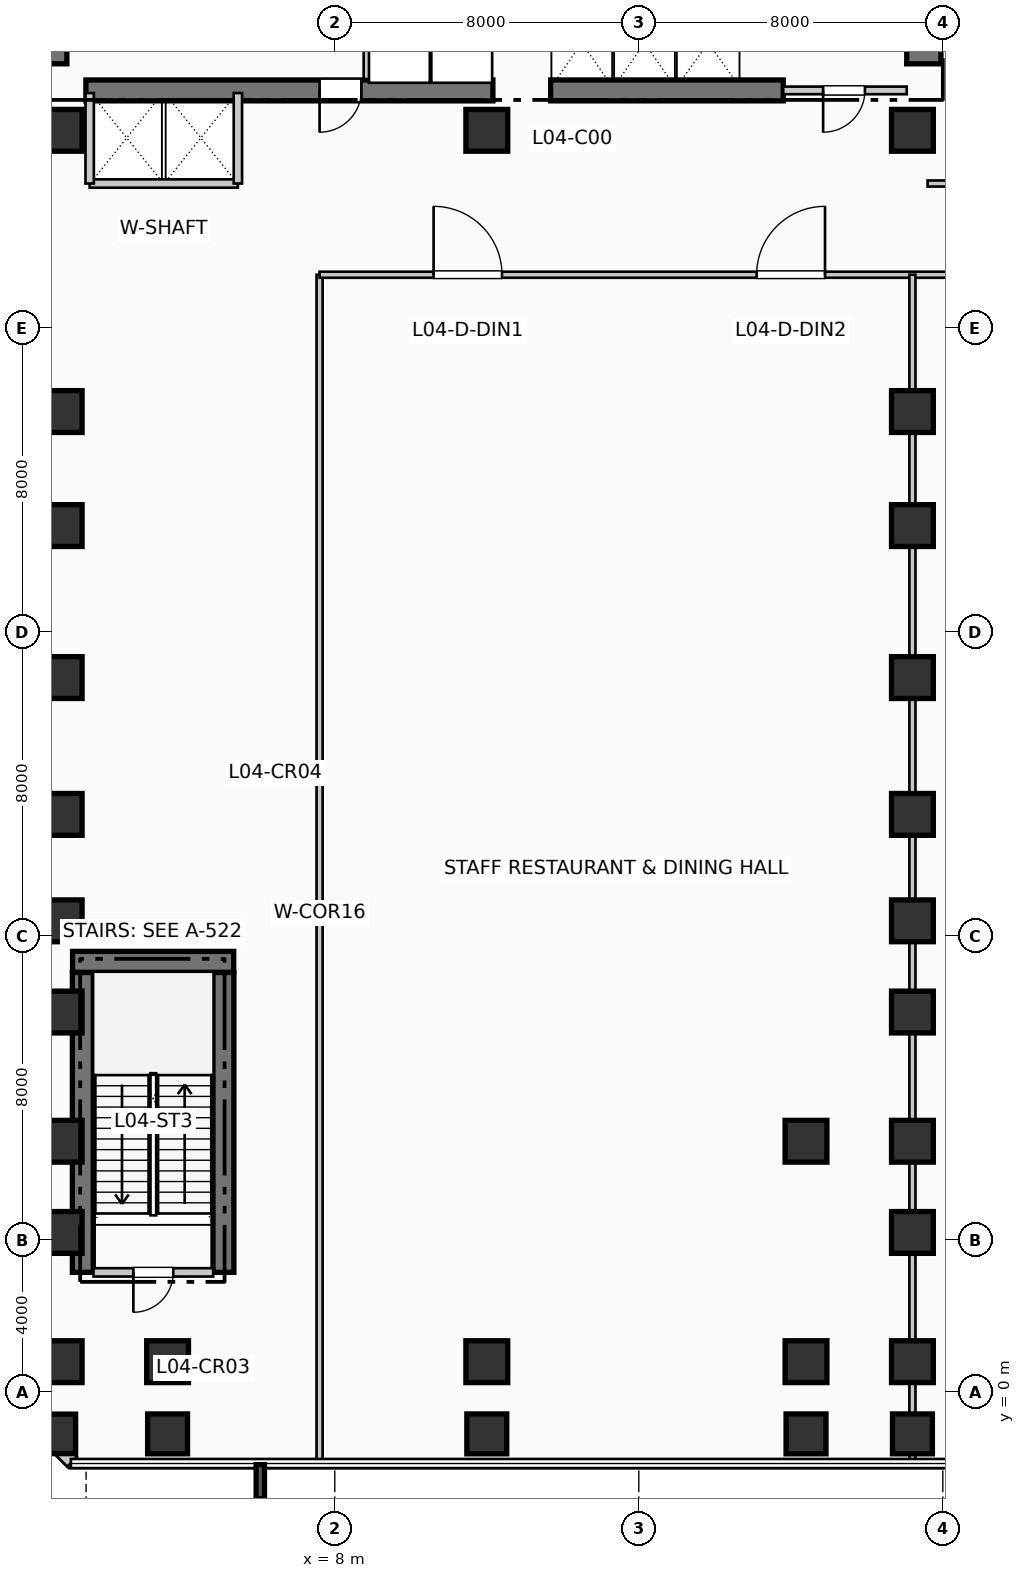
"""IFC4 building model, lengths in metres.
Left out: names, types, materials, properties, quantities, classifications, styles, units other than length and angle.
Written with IfcOpenShell. Run it as: python <this file> out.ifc"""

import sys

from ifc_helpers import new_model, si_unit, direction, frame, frame_2d, origin, origin_2d, place, context, subcontext, project, spatial, rectangle, extrude, element, fill, save


model = new_model("IFC4")
c1 = context("Model", 3, precision=1e-05, world=origin(), true_north=direction((0.0, 1.0)))
c2 = subcontext(c1, "Body", "Model", "MODEL_VIEW")
j1 = project(units=[si_unit("LENGTHUNIT", "METRE"), si_unit("PLANEANGLEUNIT", "RADIAN")], contexts=[c1])
p1 = place(None, origin())
s1 = spatial("IfcSite", under=j1, at=p1, CompositionType="ELEMENT")
p2 = place(p1, origin())
s2 = spatial("IfcBuilding", under=s1, at=p2, CompositionType="ELEMENT")
p3 = place(p2, frame((0.0, 0.0, 21.12)))
s3 = spatial("IfcBuildingStorey", under=s2, at=p3, CompositionType="ELEMENT", Elevation=21.12)
p4 = place(p3, frame((0.5, 34.95, 0.0), z_axis=(0.0, 0.0, 1.0), x_axis=(0.0, 1.0, 0.0)))
e1 = element("IfcWall", 1, at=p4, inside=s3, PredefinedType="SHEAR", context=c2, shape_type="SweptSolid", body=[
    extrude(rectangle(XDim=7.9, YDim=0.9, at=frame_2d((3.95, 0.0))), origin(), (0.0, 0.0, 1.0), 4.62),
])
p5 = place(p3, frame((23.5, 34.95, 0.0), z_axis=(0.0, 0.0, 1.0), x_axis=(0.0, 1.0, 0.0)))
e2 = element("IfcWall", 2, at=p5, inside=s3, PredefinedType="SHEAR", context=c2, shape_type="SweptSolid", body=[
    extrude(rectangle(XDim=10.64, YDim=0.9, at=frame_2d((5.32, 0.0))), origin(), (0.0, 0.0, 1.0), 4.62),
])
p6 = place(p3, frame((1.45, 34.25, 0.0), z_axis=(0.0, 0.0, 1.0), x_axis=(1.0, 0.0, 0.0)))
e3 = element("IfcWall", 3, at=p6, inside=s3, PredefinedType="SHEAR", context=c2, shape_type="SweptSolid", body=[
    extrude(rectangle(XDim=10.71, YDim=0.55, at=frame_2d((5.355, 0.0))), origin(), (0.0, 0.0, 1.0), 4.62),
])
p7 = place(p6, frame((7.25, 0.0, 0.0), z_axis=(0.0, 0.0, 1.0), x_axis=(-1.0, 0.0, 0.0)))
e4 = element("IfcOpeningElement", 4, at=p7, cuts=e3, PredefinedType="OPENING", context=c2, shape_type="SweptSolid", body=[
    extrude(rectangle(XDim=1.1, YDim=2.15, at=frame_2d((0.55, 1.075))), frame((0.0, 0.285, 0.0), z_axis=(0.0, -1.0, 0.0), x_axis=(1.0, 0.0, 0.0)), (0.0, 0.0, 1.0), 0.57),
])
p8 = place(p3, frame((13.68, 34.25, 0.0), z_axis=(0.0, 0.0, 1.0), x_axis=(1.0, 0.0, 0.0)))
e5 = element("IfcWall", 5, at=p8, inside=s3, PredefinedType="SHEAR", context=c2, shape_type="SweptSolid", body=[
    extrude(rectangle(XDim=6.12, YDim=0.55, at=frame_2d((3.06, 0.0))), origin(), (0.0, 0.0, 1.0), 4.62),
])
for number, where, z_axis, x_axis in (
    (6, (1.37, 3.15, 0.0), (0.0, 0.0, 1.0), (0.0, 1.0, 0.0)),
    (7, (5.07, 3.15, 0.0), (0.0, 0.0, 1.0), (0.0, 1.0, 0.0)),
):
    element("IfcWall", number, at=place(p3, frame(where, z_axis=z_axis, x_axis=x_axis)), inside=s3, PredefinedType="SHEAR", context=c2, shape_type="SweptSolid", body=[
        extrude(rectangle(XDim=7.89, YDim=0.55, at=frame_2d((3.945, 0.0))), origin(), (0.0, 0.0, 1.0), 4.62),
    ])
p9 = place(p3, frame((1.1, 11.32, 0.0), z_axis=(0.0, 0.0, 1.0), x_axis=(1.0, 0.0, 0.0)))
e8 = element("IfcWall", 8, at=p9, inside=s3, PredefinedType="SHEAR", context=c2, shape_type="SweptSolid", body=[
    extrude(rectangle(XDim=4.24, YDim=0.55, at=frame_2d((2.12, 0.0))), origin(), (0.0, 0.0, 1.0), 4.62),
])
p10 = place(p3, frame((0.8, -1.1, 0.0), z_axis=(0.0, 0.0, 1.0), x_axis=(1.0, 0.0, 0.0)))
e9 = element("IfcColumn", 9, at=p10, inside=s3, PredefinedType="PILASTER", context=c2, shape_type="SweptSolid", body=[
    extrude(rectangle(XDim=0.76, YDim=1.04, at=origin_2d()), origin(), (0.0, 0.0, 1.0), 4.62),
])
for number, where, z_axis, x_axis in (
    (10, (0.8, 0.8, 0.0), (0.0, 0.0, 1.0), (1.0, 0.0, 0.0)),
    (11, (0.8, 4.2, 0.0), (0.0, 0.0, 1.0), (1.0, 0.0, 0.0)),
    (12, (0.8, 6.6, 0.0), (0.0, 0.0, 1.0), (1.0, 0.0, 0.0)),
    (13, (0.8, 10.0, 0.0), (0.0, 0.0, 1.0), (1.0, 0.0, 0.0)),
    (14, (0.8, 12.4, 0.0), (0.0, 0.0, 1.0), (1.0, 0.0, 0.0)),
    (15, (0.8, 15.2, 0.0), (0.0, 0.0, 1.0), (1.0, 0.0, 0.0)),
    (16, (0.8, 18.8, 0.0), (0.0, 0.0, 1.0), (1.0, 0.0, 0.0)),
    (17, (0.8, 22.8, 0.0), (0.0, 0.0, 1.0), (1.0, 0.0, 0.0)),
    (18, (0.8, 25.8, 0.0), (0.0, 0.0, 1.0), (1.0, 0.0, 0.0)),
    (19, (0.8, 33.2, 0.0), (0.0, 0.0, 1.0), (1.0, 0.0, 0.0)),
):
    element("IfcColumn", number, at=place(p3, frame(where, z_axis=z_axis, x_axis=x_axis)), inside=s3, PredefinedType="COLUMN", context=c2, shape_type="SweptSolid", body=[
        extrude(rectangle(XDim=1.1, YDim=1.1, at=origin_2d()), origin(), (0.0, 0.0, 1.0), 4.62),
    ])
p11 = place(p3, frame((3.6, -1.1, 0.0), z_axis=(0.0, 0.0, 1.0), x_axis=(1.0, 0.0, 0.0)))
e20 = element("IfcColumn", 20, at=p11, inside=s3, PredefinedType="COLUMN", context=c2, shape_type="SweptSolid", body=[
    extrude(rectangle(XDim=1.05, YDim=1.05, at=origin_2d()), origin(), (0.0, 0.0, 1.0), 4.62),
])
p12 = place(p3, frame((3.6, 0.8, 0.0), z_axis=(0.0, 0.0, 1.0), x_axis=(1.0, 0.0, 0.0)))
e21 = element("IfcColumn", 21, at=p12, inside=s3, PredefinedType="COLUMN", context=c2, shape_type="SweptSolid", body=[
    extrude(rectangle(XDim=1.1, YDim=1.1, at=origin_2d()), origin(), (0.0, 0.0, 1.0), 4.62),
])
p13 = place(p3, frame((12.0, -1.1, 0.0), z_axis=(0.0, 0.0, 1.0), x_axis=(1.0, 0.0, 0.0)))
e22 = element("IfcColumn", 22, at=p13, inside=s3, PredefinedType="COLUMN", context=c2, shape_type="SweptSolid", body=[
    extrude(rectangle(XDim=1.05, YDim=1.05, at=origin_2d()), origin(), (0.0, 0.0, 1.0), 4.62),
])
for number, where, z_axis, x_axis in (
    (23, (12.0, 0.8, 0.0), (0.0, 0.0, 1.0), (1.0, 0.0, 0.0)),
    (24, (12.0, 33.2, 0.0), (0.0, 0.0, 1.0), (1.0, 0.0, 0.0)),
):
    element("IfcColumn", number, at=place(p3, frame(where, z_axis=z_axis, x_axis=x_axis)), inside=s3, PredefinedType="COLUMN", context=c2, shape_type="SweptSolid", body=[
        extrude(rectangle(XDim=1.1, YDim=1.1, at=origin_2d()), origin(), (0.0, 0.0, 1.0), 4.62),
    ])
p14 = place(p3, frame((20.4, -1.1, 0.0), z_axis=(0.0, 0.0, 1.0), x_axis=(1.0, 0.0, 0.0)))
e25 = element("IfcColumn", 25, at=p14, inside=s3, PredefinedType="COLUMN", context=c2, shape_type="SweptSolid", body=[
    extrude(rectangle(XDim=1.05, YDim=1.05, at=origin_2d()), origin(), (0.0, 0.0, 1.0), 4.62),
])
for number, where, z_axis, x_axis in (
    (26, (20.4, 0.8, 0.0), (0.0, 0.0, 1.0), (1.0, 0.0, 0.0)),
    (27, (20.4, 6.6, 0.0), (0.0, 0.0, 1.0), (1.0, 0.0, 0.0)),
):
    element("IfcColumn", number, at=place(p3, frame(where, z_axis=z_axis, x_axis=x_axis)), inside=s3, PredefinedType="COLUMN", context=c2, shape_type="SweptSolid", body=[
        extrude(rectangle(XDim=1.1, YDim=1.1, at=origin_2d()), origin(), (0.0, 0.0, 1.0), 4.62),
    ])
p15 = place(p3, frame((23.2, -1.1, 0.0), z_axis=(0.0, 0.0, 1.0), x_axis=(1.0, 0.0, 0.0)))
e28 = element("IfcColumn", 28, at=p15, inside=s3, PredefinedType="COLUMN", context=c2, shape_type="SweptSolid", body=[
    extrude(rectangle(XDim=1.05, YDim=1.05, at=origin_2d()), origin(), (0.0, 0.0, 1.0), 4.62),
])
for number, where, z_axis, x_axis in (
    (29, (23.2, 0.8, 0.0), (0.0, 0.0, 1.0), (1.0, 0.0, 0.0)),
    (30, (23.2, 4.2, 0.0), (0.0, 0.0, 1.0), (1.0, 0.0, 0.0)),
    (31, (23.2, 6.6, 0.0), (0.0, 0.0, 1.0), (1.0, 0.0, 0.0)),
    (32, (23.2, 10.0, 0.0), (0.0, 0.0, 1.0), (1.0, 0.0, 0.0)),
    (33, (23.2, 12.4, 0.0), (0.0, 0.0, 1.0), (1.0, 0.0, 0.0)),
    (34, (23.2, 15.2, 0.0), (0.0, 0.0, 1.0), (1.0, 0.0, 0.0)),
    (35, (23.2, 18.8, 0.0), (0.0, 0.0, 1.0), (1.0, 0.0, 0.0)),
    (36, (23.2, 22.8, 0.0), (0.0, 0.0, 1.0), (1.0, 0.0, 0.0)),
    (37, (23.2, 25.8, 0.0), (0.0, 0.0, 1.0), (1.0, 0.0, 0.0)),
    (38, (23.2, 33.2, 0.0), (0.0, 0.0, 1.0), (1.0, 0.0, 0.0)),
):
    element("IfcColumn", number, at=place(p3, frame(where, z_axis=z_axis, x_axis=x_axis)), inside=s3, PredefinedType="COLUMN", context=c2, shape_type="SweptSolid", body=[
        extrude(rectangle(XDim=1.1, YDim=1.1, at=origin_2d()), origin(), (0.0, 0.0, 1.0), 4.62),
    ])
p16 = place(p3, frame((-1.834, 1.088, 0.0), z_axis=(0.0, 0.0, 1.0), x_axis=(0.707106781187, -0.707106781187, 0.0)))
e39 = element("IfcWall", 39, at=p16, inside=s3, PredefinedType="SOLIDWALL", context=c2, shape_type="SweptSolid", body=[
    extrude(rectangle(XDim=4.133, YDim=0.36, at=frame_2d((2.066, 0.0))), origin(), (0.0, 0.0, 1.0), 4.2),
])
p17 = place(p3, frame((8.86, 34.55, 0.0), z_axis=(0.0, 0.0, 1.0), x_axis=(0.0, 1.0, 0.0)))
e40 = element("IfcWall", 40, at=p17, inside=s3, PredefinedType="PARTITIONING", context=c2, shape_type="SweptSolid", body=[
    extrude(rectangle(XDim=2.5, YDim=0.2, at=frame_2d((1.25, 0.0))), origin(), (0.0, 0.0, 1.0), 4.2),
])
p18 = place(p3, frame((19.8, 34.25, 0.0), z_axis=(0.0, 0.0, 1.0), x_axis=(1.0, 0.0, 0.0)))
e41 = element("IfcWall", 41, at=p18, inside=s3, PredefinedType="PARTITIONING", context=c2, shape_type="SweptSolid", body=[
    extrude(rectangle(XDim=3.25, YDim=0.2, at=frame_2d((1.625, 0.0))), origin(), (0.0, 0.0, 1.0), 4.2),
])
p19 = place(p18, frame((2.15, 0.0, 0.0), z_axis=(0.0, 0.0, 1.0), x_axis=(-1.0, 0.0, 0.0)))
e42 = element("IfcOpeningElement", 42, at=p19, cuts=e41, PredefinedType="OPENING", context=c2, shape_type="SweptSolid", body=[
    extrude(rectangle(XDim=1.1, YDim=2.15, at=frame_2d((0.55, 1.075))), frame((0.0, 0.11, 0.0), z_axis=(0.0, -1.0, 0.0), x_axis=(1.0, 0.0, 0.0)), (0.0, 0.0, 1.0), 0.22),
])
p20 = place(p3, frame((1.55, 31.8, 0.0), z_axis=(0.0, 0.0, 1.0), x_axis=(1.0, 0.0, 0.0)))
e43 = element("IfcWall", 43, at=p20, inside=s3, PredefinedType="PARTITIONING", context=c2, shape_type="SweptSolid", body=[
    extrude(rectangle(XDim=3.9, YDim=0.22, at=frame_2d((1.95, 0.0))), origin(), (0.0, 0.0, 1.0), 4.2),
])
for number, where, z_axis, x_axis in (
    (44, (1.55, 31.8, 0.0), (0.0, 0.0, 1.0), (0.0, 1.0, 0.0)),
    (45, (5.45, 31.8, 0.0), (0.0, 0.0, 1.0), (0.0, 1.0, 0.0)),
):
    element("IfcWall", number, at=place(p3, frame(where, z_axis=z_axis, x_axis=x_axis)), inside=s3, PredefinedType="PARTITIONING", context=c2, shape_type="SweptSolid", body=[
        extrude(rectangle(XDim=2.38, YDim=0.22, at=frame_2d((1.19, 0.0))), origin(), (0.0, 0.0, 1.0), 4.2),
    ])
p21 = place(p3, frame((1.65, 3.15, 0.0), z_axis=(0.0, 0.0, 1.0), x_axis=(1.0, 0.0, 0.0)))
e46 = element("IfcWall", 46, at=p21, inside=s3, PredefinedType="PARTITIONING", context=c2, shape_type="SweptSolid", body=[
    extrude(rectangle(XDim=3.15, YDim=0.22, at=frame_2d((1.575, 0.0))), origin(), (0.0, 0.0, 1.0), 4.2),
])
p22 = place(p21, frame((2.1, 0.0, 0.0), z_axis=(0.0, 0.0, 1.0), x_axis=(-1.0, 0.0, 0.0)))
e47 = element("IfcOpeningElement", 47, at=p22, cuts=e46, PredefinedType="OPENING", context=c2, shape_type="SweptSolid", body=[
    extrude(rectangle(XDim=1.05, YDim=2.15, at=frame_2d((0.525, 1.075))), frame((0.0, 0.12, 0.0), z_axis=(0.0, -1.0, 0.0), x_axis=(1.0, 0.0, 0.0)), (0.0, 0.0, 1.0), 0.24),
])
p23 = place(p3, frame((7.6, -1.81, 0.0), z_axis=(0.0, 0.0, 1.0), x_axis=(0.0, 1.0, 0.0)))
e48 = element("IfcWall", 48, at=p23, inside=s3, PredefinedType="PARTITIONING", context=c2, shape_type="SweptSolid", body=[
    extrude(rectangle(XDim=31.21, YDim=0.16, at=frame_2d((15.605, 0.0))), origin(), (0.0, 0.0, 1.0), 2.42),
])
p24 = place(p3, frame((7.6, 29.4, 0.0), z_axis=(0.0, 0.0, 1.0), x_axis=(1.0, 0.0, 0.0)))
e49 = element("IfcWall", 49, at=p24, inside=s3, PredefinedType="PARTITIONING", context=c2, shape_type="SweptSolid", body=[
    extrude(rectangle(XDim=43.75, YDim=0.16, at=frame_2d((21.875, 0.0))), origin(), (0.0, 0.0, 1.0), 3.855),
])
p25 = place(p24, frame((3.0, 0.0, 0.0)))
e50 = element("IfcOpeningElement", 50, at=p25, cuts=e49, PredefinedType="OPENING", context=c2, shape_type="SweptSolid", body=[
    extrude(rectangle(XDim=1.8, YDim=2.3, at=frame_2d((0.9, 1.15))), frame((0.0, 0.09, 0.0), z_axis=(0.0, -1.0, 0.0), x_axis=(1.0, 0.0, 0.0)), (0.0, 0.0, 1.0), 0.18),
])
p26 = place(p24, frame((11.5, 0.0, 0.0)))
e51 = element("IfcOpeningElement", 51, at=p26, cuts=e49, PredefinedType="OPENING", context=c2, shape_type="SweptSolid", body=[
    extrude(rectangle(XDim=1.8, YDim=2.3, at=frame_2d((0.9, 1.15))), frame((0.0, 0.09, 0.0), z_axis=(0.0, -1.0, 0.0), x_axis=(1.0, 0.0, 0.0)), (0.0, 0.0, 1.0), 0.18),
])
p27 = place(p24, frame((18.0, 0.0, 0.0)))
e52 = element("IfcOpeningElement", 52, at=p27, cuts=e49, PredefinedType="OPENING", context=c2, shape_type="SweptSolid", body=[
    extrude(rectangle(XDim=1.8, YDim=2.3, at=frame_2d((0.9, 1.15))), frame((0.0, 0.09, 0.0), z_axis=(0.0, -1.0, 0.0), x_axis=(1.0, 0.0, 0.0)), (0.0, 0.0, 1.0), 0.18),
])
p28 = place(p24, frame((27.0, 0.0, 0.0)))
e53 = element("IfcOpeningElement", 53, at=p28, cuts=e49, PredefinedType="OPENING", context=c2, shape_type="SweptSolid", body=[
    extrude(rectangle(XDim=0.95, YDim=2.15, at=frame_2d((0.475, 1.075))), frame((0.0, 0.09, 0.0), z_axis=(0.0, -1.0, 0.0), x_axis=(1.0, 0.0, 0.0)), (0.0, 0.0, 1.0), 0.18),
])
p29 = place(p3, frame((23.2, -1.81, 0.0), z_axis=(0.0, 0.0, 1.0), x_axis=(0.0, 1.0, 0.0)))
e54 = element("IfcWall", 54, at=p29, inside=s3, PredefinedType="PARTITIONING", context=c2, shape_type="SweptSolid", body=[
    extrude(rectangle(XDim=31.21, YDim=0.16, at=frame_2d((15.605, 0.0))), origin(), (0.0, 0.0, 1.0), 3.385),
])
p30 = place(p3, frame((23.6, 31.8, 0.0), z_axis=(0.0, 0.0, 1.0), x_axis=(1.0, 0.0, 0.0)))
e55 = element("IfcWall", 55, at=p30, inside=s3, PredefinedType="PARTITIONING", context=c2, shape_type="SweptSolid", body=[
    extrude(rectangle(XDim=42.21, YDim=0.16, at=frame_2d((21.105, 0.0))), origin(), (0.0, 0.0, 1.0), 4.2),
])
p31 = place(p30, frame((5.0, 0.0, 0.0)))
e56 = element("IfcOpeningElement", 56, at=p31, cuts=e55, PredefinedType="OPENING", context=c2, shape_type="SweptSolid", body=[
    extrude(rectangle(XDim=1.8, YDim=2.3, at=frame_2d((0.9, 1.15))), frame((0.0, 0.09, 0.0), z_axis=(0.0, -1.0, 0.0), x_axis=(1.0, 0.0, 0.0)), (0.0, 0.0, 1.0), 0.18),
])
p32 = place(p30, frame((22.0, 0.0, 0.0)))
e57 = element("IfcOpeningElement", 57, at=p32, cuts=e55, PredefinedType="OPENING", context=c2, shape_type="SweptSolid", body=[
    extrude(rectangle(XDim=0.95, YDim=2.1, at=frame_2d((0.475, 1.05))), frame((0.0, 0.09, 0.0), z_axis=(0.0, -1.0, 0.0), x_axis=(1.0, 0.0, 0.0)), (0.0, 0.0, 1.0), 0.18),
])
p33 = place(p30, frame((33.0, 0.0, 0.0)))
e58 = element("IfcOpeningElement", 58, at=p33, cuts=e55, PredefinedType="OPENING", context=c2, shape_type="SweptSolid", body=[
    extrude(rectangle(XDim=0.95, YDim=2.1, at=frame_2d((0.475, 1.05))), frame((0.0, 0.09, 0.0), z_axis=(0.0, -1.0, 0.0), x_axis=(1.0, 0.0, 0.0)), (0.0, 0.0, 1.0), 0.18),
])
p34 = place(p7, origin())
e59 = element("IfcDoor", 59, at=p34, inside=s3, OperationType="SINGLE_SWING_LEFT", PredefinedType="DOOR", context=c2, shape_type="SweptSolid", body=[
    extrude(rectangle(XDim=1.1, YDim=2.15, at=frame_2d((0.55, 1.075))), frame((0.0, 0.025, 0.0), z_axis=(0.0, -1.0, 0.0), x_axis=(1.0, 0.0, 0.0)), (0.0, 0.0, 1.0), 0.05),
])
fill(e4, e59)
p35 = place(p19, origin())
e60 = element("IfcDoor", 60, at=p35, inside=s3, OperationType="SINGLE_SWING_LEFT", PredefinedType="DOOR", context=c2, shape_type="SweptSolid", body=[
    extrude(rectangle(XDim=1.1, YDim=2.15, at=frame_2d((0.55, 1.075))), frame((0.0, 0.025, 0.0), z_axis=(0.0, -1.0, 0.0), x_axis=(1.0, 0.0, 0.0)), (0.0, 0.0, 1.0), 0.05),
])
fill(e42, e60)
p36 = place(p22, origin())
e61 = element("IfcDoor", 61, at=p36, inside=s3, OperationType="SINGLE_SWING_LEFT", PredefinedType="DOOR", context=c2, shape_type="SweptSolid", body=[
    extrude(rectangle(XDim=1.05, YDim=2.15, at=frame_2d((0.525, 1.075))), frame((0.0, 0.025, 0.0), z_axis=(0.0, -1.0, 0.0), x_axis=(1.0, 0.0, 0.0)), (0.0, 0.0, 1.0), 0.05),
])
fill(e47, e61)
p37 = place(p25, origin())
e62 = element("IfcDoor", 62, at=p37, inside=s3, OperationType="SINGLE_SWING_LEFT", PredefinedType="DOOR", context=c2, shape_type="SweptSolid", body=[
    extrude(rectangle(XDim=1.8, YDim=2.3, at=frame_2d((0.9, 1.15))), frame((0.0, 0.025, 0.0), z_axis=(0.0, -1.0, 0.0), x_axis=(1.0, 0.0, 0.0)), (0.0, 0.0, 1.0), 0.05),
])
fill(e50, e62)
p38 = place(p26, origin())
e63 = element("IfcDoor", 63, at=p38, inside=s3, OperationType="SINGLE_SWING_RIGHT", PredefinedType="DOOR", context=c2, shape_type="SweptSolid", body=[
    extrude(rectangle(XDim=1.8, YDim=2.3, at=frame_2d((0.9, 1.15))), frame((0.0, 0.025, 0.0), z_axis=(0.0, -1.0, 0.0), x_axis=(1.0, 0.0, 0.0)), (0.0, 0.0, 1.0), 0.05),
])
fill(e51, e63)
save(model, sys.argv[1])
